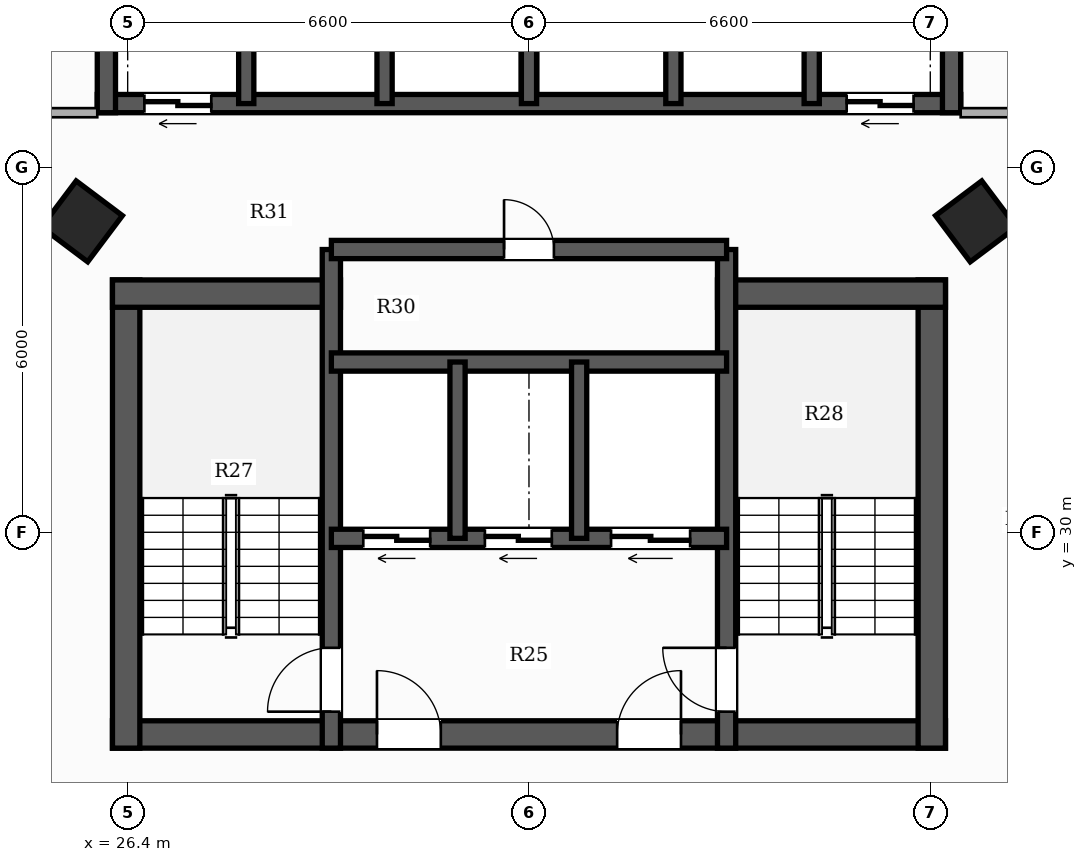
"""IFC4 building model, lengths in metres.
Left out: names, types, materials, properties, quantities, classifications, styles, units other than length and angle.
Written with IfcOpenShell. Run it as: python <this file> out.ifc"""

import sys

from ifc_helpers import new_model, si_unit, direction, frame, frame_2d, origin, origin_2d, place, context, subcontext, project, spatial, rectangle, hollow_rectangle, extrude, element, fill, save


model = new_model("IFC4")
c1 = context("Model", 3, precision=1e-05, world=origin(), true_north=direction((0.0, 1.0)))
c2 = subcontext(c1, "Body", "Model", "MODEL_VIEW")
j1 = project(units=[si_unit("LENGTHUNIT", "METRE"), si_unit("PLANEANGLEUNIT", "RADIAN")], contexts=[c1])
p1 = place(None, origin())
s1 = spatial("IfcSite", under=j1, at=p1, CompositionType="ELEMENT")
p2 = place(p1, origin())
s2 = spatial("IfcBuilding", under=s1, at=p2, CompositionType="ELEMENT")
p3 = place(p2, frame((0.0, 0.0, 77.45)))
s3 = spatial("IfcBuildingStorey", under=s2, at=p3, CompositionType="ELEMENT", Elevation=77.45)
p4 = place(p3, frame((26.15, 26.675, 0.0), z_axis=(0.0, 0.0, 1.0), x_axis=(1.0, 0.0, 0.0)))
e1 = element("IfcWall", 1, at=p4, inside=s3, PredefinedType="SHEAR", context=c2, shape_type="SweptSolid", body=[
    extrude(rectangle(XDim=13.7, YDim=0.45, at=frame_2d((6.85, 0.0))), origin(), (0.0, 0.0, 1.0), 3.3),
])
p5 = place(p4, frame((4.35, 0.0, 0.0)))
e2 = element("IfcOpeningElement", 2, at=p5, cuts=e1, PredefinedType="OPENING", context=c2, shape_type="SweptSolid", body=[
    extrude(rectangle(XDim=1.05, YDim=2.15, at=frame_2d((0.525, 1.075))), frame((0.0, 0.235, 0.0), z_axis=(0.0, -1.0, 0.0), x_axis=(1.0, 0.0, 0.0)), (0.0, 0.0, 1.0), 0.47),
])
p6 = place(p4, frame((8.3, 0.0, 0.0)))
e3 = element("IfcOpeningElement", 3, at=p6, cuts=e1, PredefinedType="OPENING", context=c2, shape_type="SweptSolid", body=[
    extrude(rectangle(XDim=1.05, YDim=2.15, at=frame_2d((0.525, 1.075))), frame((0.0, 0.235, 0.0), z_axis=(0.0, -1.0, 0.0), x_axis=(1.0, 0.0, 0.0)), (0.0, 0.0, 1.0), 0.47),
])
p7 = place(p3, frame((26.375, 26.45, 0.0), z_axis=(0.0, 0.0, 1.0), x_axis=(0.0, 1.0, 0.0)))
e4 = element("IfcWall", 4, at=p7, inside=s3, PredefinedType="SHEAR", context=c2, shape_type="SweptSolid", body=[
    extrude(rectangle(XDim=7.7, YDim=0.45, at=frame_2d((3.85, 0.0))), origin(), (0.0, 0.0, 1.0), 3.3),
])
p8 = place(p3, frame((26.15, 33.925, 0.0), z_axis=(0.0, 0.0, 1.0), x_axis=(1.0, 0.0, 0.0)))
e5 = element("IfcWall", 5, at=p8, inside=s3, PredefinedType="SHEAR", context=c2, shape_type="SweptSolid", body=[
    extrude(rectangle(XDim=3.75, YDim=0.45, at=frame_2d((1.875, 0.0))), origin(), (0.0, 0.0, 1.0), 3.3),
])
p9 = place(p3, frame((39.625, 26.45, 0.0), z_axis=(0.0, 0.0, 1.0), x_axis=(0.0, 1.0, 0.0)))
e6 = element("IfcWall", 6, at=p9, inside=s3, PredefinedType="SHEAR", context=c2, shape_type="SweptSolid", body=[
    extrude(rectangle(XDim=7.7, YDim=0.45, at=frame_2d((3.85, 0.0))), origin(), (0.0, 0.0, 1.0), 3.3),
])
p10 = place(p3, frame((36.1, 33.925, 0.0), z_axis=(0.0, 0.0, 1.0), x_axis=(1.0, 0.0, 0.0)))
e7 = element("IfcWall", 7, at=p10, inside=s3, PredefinedType="SHEAR", context=c2, shape_type="SweptSolid", body=[
    extrude(rectangle(XDim=3.75, YDim=0.45, at=frame_2d((1.875, 0.0))), origin(), (0.0, 0.0, 1.0), 3.3),
])
p11 = place(p3, frame((29.75, 26.45, 0.0), z_axis=(0.0, 0.0, 1.0), x_axis=(0.0, 1.0, 0.0)))
e8 = element("IfcWall", 8, at=p11, inside=s3, PredefinedType="SHEAR", context=c2, shape_type="SweptSolid", body=[
    extrude(rectangle(XDim=8.2, YDim=0.3, at=frame_2d((4.1, 0.0))), origin(), (0.0, 0.0, 1.0), 3.3),
])
p12 = place(p11, frame((0.6, 0.0, 0.0)))
e9 = element("IfcOpeningElement", 9, at=p12, cuts=e8, PredefinedType="OPENING", context=c2, shape_type="SweptSolid", body=[
    extrude(rectangle(XDim=1.05, YDim=2.15, at=frame_2d((0.525, 1.075))), frame((0.0, 0.16, 0.0), z_axis=(0.0, -1.0, 0.0), x_axis=(1.0, 0.0, 0.0)), (0.0, 0.0, 1.0), 0.32),
])
p13 = place(p3, frame((36.25, 26.45, 0.0), z_axis=(0.0, 0.0, 1.0), x_axis=(0.0, 1.0, 0.0)))
e10 = element("IfcWall", 10, at=p13, inside=s3, PredefinedType="SHEAR", context=c2, shape_type="SweptSolid", body=[
    extrude(rectangle(XDim=8.2, YDim=0.3, at=frame_2d((4.1, 0.0))), origin(), (0.0, 0.0, 1.0), 3.3),
])
p14 = place(p13, frame((0.6, 0.0, 0.0)))
e11 = element("IfcOpeningElement", 11, at=p14, cuts=e10, PredefinedType="OPENING", context=c2, shape_type="SweptSolid", body=[
    extrude(rectangle(XDim=1.05, YDim=2.15, at=frame_2d((0.525, 1.075))), frame((0.0, 0.16, 0.0), z_axis=(0.0, -1.0, 0.0), x_axis=(1.0, 0.0, 0.0)), (0.0, 0.0, 1.0), 0.32),
])
p15 = place(p3, frame((36.25, 29.9, 0.0), z_axis=(0.0, 0.0, 1.0), x_axis=(-1.0, 0.0, 0.0)))
e12 = element("IfcWall", 12, at=p15, inside=s3, PredefinedType="SHEAR", context=c2, shape_type="SweptSolid", body=[
    extrude(rectangle(XDim=6.5, YDim=0.3, at=frame_2d((3.25, 0.0))), origin(), (0.0, 0.0, 1.0), 3.3),
])
p16 = place(p15, frame((4.875, 0.0, 0.0)))
e13 = element("IfcOpeningElement", 13, at=p16, cuts=e12, PredefinedType="OPENING", context=c2, shape_type="SweptSolid", body=[
    extrude(rectangle(XDim=1.1, YDim=2.2, at=frame_2d((0.55, 1.1))), frame((0.0, 0.16, 0.0), z_axis=(0.0, -1.0, 0.0), x_axis=(1.0, 0.0, 0.0)), (0.0, 0.0, 1.0), 0.32),
])
p17 = place(p15, frame((2.875, 0.0, 0.0)))
e14 = element("IfcOpeningElement", 14, at=p17, cuts=e12, PredefinedType="OPENING", context=c2, shape_type="SweptSolid", body=[
    extrude(rectangle(XDim=1.1, YDim=2.2, at=frame_2d((0.55, 1.1))), frame((0.0, 0.16, 0.0), z_axis=(0.0, -1.0, 0.0), x_axis=(1.0, 0.0, 0.0)), (0.0, 0.0, 1.0), 0.32),
])
p18 = place(p15, frame((0.6, 0.0, 0.0)))
e15 = element("IfcOpeningElement", 15, at=p18, cuts=e12, PredefinedType="OPENING", context=c2, shape_type="SweptSolid", body=[
    extrude(rectangle(XDim=1.3, YDim=2.2, at=frame_2d((0.65, 1.1))), frame((0.0, 0.16, 0.0), z_axis=(0.0, -1.0, 0.0), x_axis=(1.0, 0.0, 0.0)), (0.0, 0.0, 1.0), 0.32),
])
p19 = place(p3, frame((29.75, 32.8, 0.0), z_axis=(0.0, 0.0, 1.0), x_axis=(1.0, 0.0, 0.0)))
e16 = element("IfcWall", 16, at=p19, inside=s3, PredefinedType="SHEAR", context=c2, shape_type="SweptSolid", body=[
    extrude(rectangle(XDim=6.5, YDim=0.3, at=frame_2d((3.25, 0.0))), origin(), (0.0, 0.0, 1.0), 3.3),
])
for number, where, z_axis, x_axis in (
    (17, (31.825, 29.9, 0.0), (0.0, 0.0, 1.0), (0.0, 1.0, 0.0)),
    (18, (33.825, 29.9, 0.0), (0.0, 0.0, 1.0), (0.0, 1.0, 0.0)),
):
    element("IfcWall", number, at=place(p3, frame(where, z_axis=z_axis, x_axis=x_axis)), inside=s3, PredefinedType="SHEAR", context=c2, shape_type="SweptSolid", body=[
        extrude(rectangle(XDim=2.9, YDim=0.25, at=frame_2d((1.45, 0.0))), origin(), (0.0, 0.0, 1.0), 3.3),
    ])
p20 = place(p3, frame((29.75, 34.65, 0.0), z_axis=(0.0, 0.0, 1.0), x_axis=(1.0, 0.0, 0.0)))
e19 = element("IfcWall", 19, at=p20, inside=s3, PredefinedType="SHEAR", context=c2, shape_type="SweptSolid", body=[
    extrude(rectangle(XDim=6.5, YDim=0.3, at=frame_2d((3.25, 0.0))), origin(), (0.0, 0.0, 1.0), 3.3),
])
p21 = place(p20, frame((2.84, 0.0, 0.0)))
e20 = element("IfcOpeningElement", 20, at=p21, cuts=e19, PredefinedType="OPENING", context=c2, shape_type="SweptSolid", body=[
    extrude(rectangle(XDim=0.82, YDim=2.1, at=frame_2d((0.41, 1.05))), frame((0.0, 0.16, 0.0), z_axis=(0.0, -1.0, 0.0), x_axis=(1.0, 0.0, 0.0)), (0.0, 0.0, 1.0), 0.32),
])
p22 = place(p3, frame((40.1, 37.05, 0.0), z_axis=(0.0, 0.0, 1.0), x_axis=(-1.0, 0.0, 0.0)))
e21 = element("IfcWall", 21, at=p22, inside=s3, PredefinedType="SHEAR", context=c2, shape_type="SweptSolid", body=[
    extrude(rectangle(XDim=14.2, YDim=0.3, at=frame_2d((7.1, 0.0))), origin(), (0.0, 0.0, 1.0), 3.3),
])
p23 = place(p22, frame((12.325, 0.0, 0.0)))
e22 = element("IfcOpeningElement", 22, at=p23, cuts=e21, PredefinedType="OPENING", context=c2, shape_type="SweptSolid", body=[
    extrude(rectangle(XDim=1.1, YDim=2.2, at=frame_2d((0.55, 1.1))), frame((0.0, 0.16, 0.0), z_axis=(0.0, -1.0, 0.0), x_axis=(1.0, 0.0, 0.0)), (0.0, 0.0, 1.0), 0.32),
])
p24 = place(p22, frame((0.775, 0.0, 0.0)))
e23 = element("IfcOpeningElement", 23, at=p24, cuts=e21, PredefinedType="OPENING", context=c2, shape_type="SweptSolid", body=[
    extrude(rectangle(XDim=1.1, YDim=2.2, at=frame_2d((0.55, 1.1))), frame((0.0, 0.16, 0.0), z_axis=(0.0, -1.0, 0.0), x_axis=(1.0, 0.0, 0.0)), (0.0, 0.0, 1.0), 0.32),
])
for number, where, z_axis, x_axis in (
    (24, (26.05, 36.9, 0.0), (0.0, 0.0, 1.0), (0.0, 1.0, 0.0)),
    (25, (39.95, 36.9, 0.0), (0.0, 0.0, 1.0), (0.0, 1.0, 0.0)),
):
    element("IfcWall", number, at=place(p3, frame(where, z_axis=z_axis, x_axis=x_axis)), inside=s3, PredefinedType="SHEAR", context=c2, shape_type="SweptSolid", body=[
        extrude(rectangle(XDim=2.85, YDim=0.3, at=frame_2d((1.425, 0.0))), origin(), (0.0, 0.0, 1.0), 3.3),
    ])
for number, where, z_axis, x_axis in (
    (26, (28.35, 37.05, 0.0), (0.0, 0.0, 1.0), (0.0, 1.0, 0.0)),
    (27, (30.625, 37.05, 0.0), (0.0, 0.0, 1.0), (0.0, 1.0, 0.0)),
    (28, (33.0, 37.05, 0.0), (0.0, 0.0, 1.0), (0.0, 1.0, 0.0)),
    (29, (35.375, 37.05, 0.0), (0.0, 0.0, 1.0), (0.0, 1.0, 0.0)),
    (30, (37.65, 37.05, 0.0), (0.0, 0.0, 1.0), (0.0, 1.0, 0.0)),
):
    element("IfcWall", number, at=place(p3, frame(where, z_axis=z_axis, x_axis=x_axis)), inside=s3, PredefinedType="SHEAR", context=c2, shape_type="SweptSolid", body=[
        extrude(rectangle(XDim=2.55, YDim=0.25, at=frame_2d((1.275, 0.0))), origin(), (0.0, 0.0, 1.0), 3.3),
    ])
for number, where, z_axis, x_axis in (
    (31, (25.648, 35.113, 0.0), (0.0, 0.0, 1.0), (0.6, 0.8, 0.0)),
    (32, (40.352, 35.113, 0.0), (0.0, 0.0, 1.0), (-0.6, 0.8, 0.0)),
):
    element("IfcColumn", number, at=place(p3, frame(where, z_axis=z_axis, x_axis=x_axis)), inside=s3, PredefinedType="COLUMN", context=c2, shape_type="SweptSolid", body=[
        extrude(hollow_rectangle(XDim=0.95, YDim=0.95, WallThickness=0.032, at=origin_2d()), origin(), (0.0, 0.0, 1.0), 3.3),
    ])
p25 = place(p3, frame((40.1, 36.9, 0.0), z_axis=(0.0, 0.0, 1.0), x_axis=(1.0, 0.0, 0.0)))
e33 = element("IfcWall", 33, at=p25, inside=s3, PredefinedType="PARTITIONING", context=c2, shape_type="SweptSolid", body=[
    extrude(rectangle(XDim=2.55, YDim=0.15, at=frame_2d((1.275, 0.0))), origin(), (0.0, 0.0, 1.0), 2.413),
])
p26 = place(p3, frame((23.41, 36.9, 0.0), z_axis=(0.0, 0.0, 1.0), x_axis=(1.0, 0.0, 0.0)))
e34 = element("IfcWall", 34, at=p26, inside=s3, PredefinedType="PARTITIONING", context=c2, shape_type="SweptSolid", body=[
    extrude(rectangle(XDim=2.49, YDim=0.15, at=frame_2d((1.245, 0.0))), origin(), (0.0, 0.0, 1.0), 2.413),
])
p27 = place(p12, origin())
e35 = element("IfcDoor", 35, at=p27, inside=s3, OperationType="SINGLE_SWING_LEFT", PredefinedType="DOOR", context=c2, shape_type="SweptSolid", body=[
    extrude(rectangle(XDim=1.05, YDim=2.15, at=frame_2d((0.525, 1.075))), frame((0.0, 0.025, 0.0), z_axis=(0.0, -1.0, 0.0), x_axis=(1.0, 0.0, 0.0)), (0.0, 0.0, 1.0), 0.05),
])
fill(e9, e35)
p28 = place(p14, origin())
e36 = element("IfcDoor", 36, at=p28, inside=s3, OperationType="SINGLE_SWING_RIGHT", PredefinedType="DOOR", context=c2, shape_type="SweptSolid", body=[
    extrude(rectangle(XDim=1.05, YDim=2.15, at=frame_2d((0.525, 1.075))), frame((0.0, 0.025, 0.0), z_axis=(0.0, -1.0, 0.0), x_axis=(1.0, 0.0, 0.0)), (0.0, 0.0, 1.0), 0.05),
])
fill(e11, e36)
p29 = place(p5, origin())
e37 = element("IfcDoor", 37, at=p29, inside=s3, OperationType="SINGLE_SWING_LEFT", PredefinedType="DOOR", context=c2, shape_type="SweptSolid", body=[
    extrude(rectangle(XDim=1.05, YDim=2.15, at=frame_2d((0.525, 1.075))), frame((0.0, 0.025, 0.0), z_axis=(0.0, -1.0, 0.0), x_axis=(1.0, 0.0, 0.0)), (0.0, 0.0, 1.0), 0.05),
])
fill(e2, e37)
p30 = place(p6, origin())
e38 = element("IfcDoor", 38, at=p30, inside=s3, OperationType="SINGLE_SWING_RIGHT", PredefinedType="DOOR", context=c2, shape_type="SweptSolid", body=[
    extrude(rectangle(XDim=1.05, YDim=2.15, at=frame_2d((0.525, 1.075))), frame((0.0, 0.025, 0.0), z_axis=(0.0, -1.0, 0.0), x_axis=(1.0, 0.0, 0.0)), (0.0, 0.0, 1.0), 0.05),
])
fill(e3, e38)
p31 = place(p16, origin())
e39 = element("IfcDoor", 39, at=p31, inside=s3, OperationType="DOUBLE_DOOR_SLIDING", PredefinedType="DOOR", context=c2, shape_type="SweptSolid", body=[
    extrude(rectangle(XDim=1.1, YDim=2.2, at=frame_2d((0.55, 1.1))), frame((0.0, 0.025, 0.0), z_axis=(0.0, -1.0, 0.0), x_axis=(1.0, 0.0, 0.0)), (0.0, 0.0, 1.0), 0.05),
])
fill(e13, e39)
p32 = place(p17, origin())
e40 = element("IfcDoor", 40, at=p32, inside=s3, OperationType="DOUBLE_DOOR_SLIDING", PredefinedType="DOOR", context=c2, shape_type="SweptSolid", body=[
    extrude(rectangle(XDim=1.1, YDim=2.2, at=frame_2d((0.55, 1.1))), frame((0.0, 0.025, 0.0), z_axis=(0.0, -1.0, 0.0), x_axis=(1.0, 0.0, 0.0)), (0.0, 0.0, 1.0), 0.05),
])
fill(e14, e40)
p33 = place(p18, origin())
e41 = element("IfcDoor", 41, at=p33, inside=s3, OperationType="DOUBLE_DOOR_SLIDING", PredefinedType="DOOR", context=c2, shape_type="SweptSolid", body=[
    extrude(rectangle(XDim=1.3, YDim=2.2, at=frame_2d((0.65, 1.1))), frame((0.0, 0.025, 0.0), z_axis=(0.0, -1.0, 0.0), x_axis=(1.0, 0.0, 0.0)), (0.0, 0.0, 1.0), 0.05),
])
fill(e15, e41)
p34 = place(p23, origin())
e42 = element("IfcDoor", 42, at=p34, inside=s3, OperationType="DOUBLE_DOOR_SLIDING", PredefinedType="DOOR", context=c2, shape_type="SweptSolid", body=[
    extrude(rectangle(XDim=1.1, YDim=2.2, at=frame_2d((0.55, 1.1))), frame((0.0, 0.025, 0.0), z_axis=(0.0, -1.0, 0.0), x_axis=(1.0, 0.0, 0.0)), (0.0, 0.0, 1.0), 0.05),
])
fill(e22, e42)
p35 = place(p24, origin())
e43 = element("IfcDoor", 43, at=p35, inside=s3, OperationType="DOUBLE_DOOR_SLIDING", PredefinedType="DOOR", context=c2, shape_type="SweptSolid", body=[
    extrude(rectangle(XDim=1.1, YDim=2.2, at=frame_2d((0.55, 1.1))), frame((0.0, 0.025, 0.0), z_axis=(0.0, -1.0, 0.0), x_axis=(1.0, 0.0, 0.0)), (0.0, 0.0, 1.0), 0.05),
])
fill(e23, e43)
p36 = place(p21, origin())
e44 = element("IfcDoor", 44, at=p36, inside=s3, OperationType="SINGLE_SWING_LEFT", PredefinedType="DOOR", context=c2, shape_type="SweptSolid", body=[
    extrude(rectangle(XDim=0.82, YDim=2.1, at=frame_2d((0.41, 1.05))), frame((0.0, 0.025, 0.0), z_axis=(0.0, -1.0, 0.0), x_axis=(1.0, 0.0, 0.0)), (0.0, 0.0, 1.0), 0.05),
])
fill(e20, e44)
save(model, sys.argv[1])
